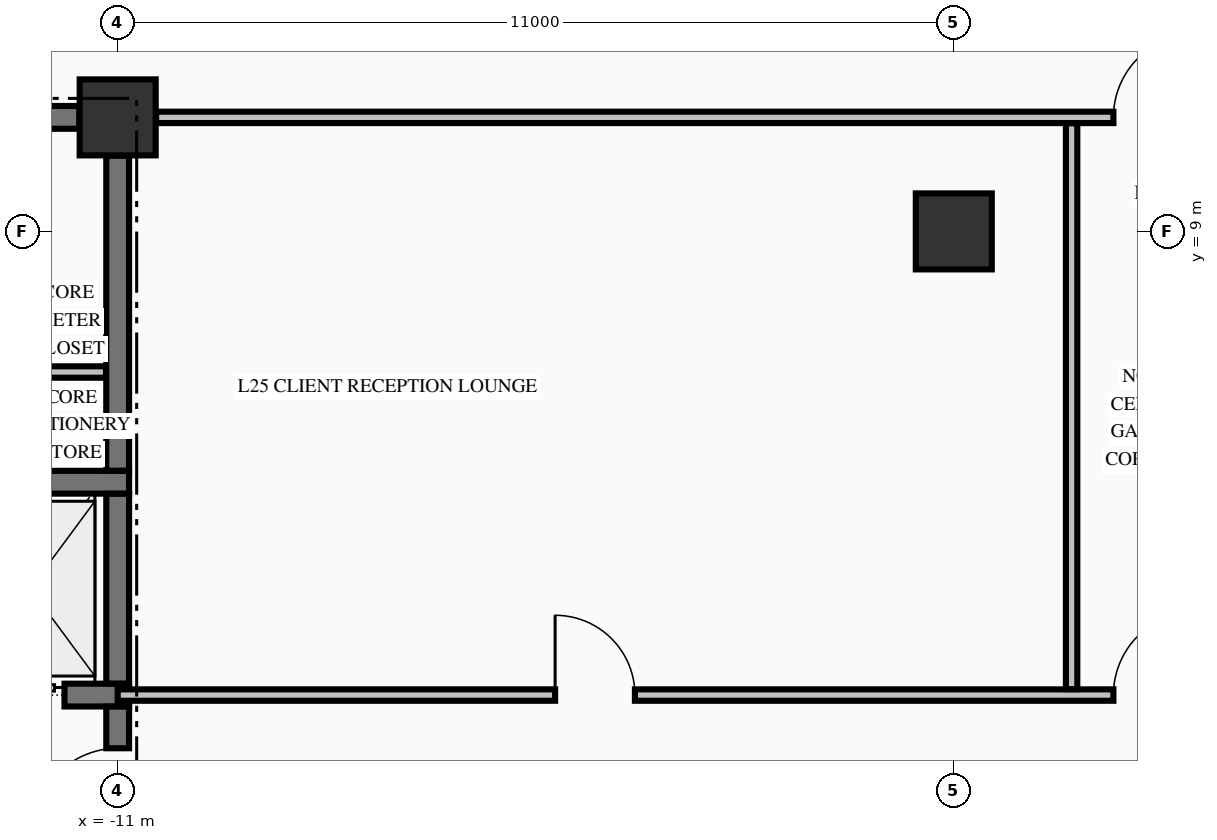
"""IFC4 building model, lengths in metres.
Left out: names, types, materials, properties, quantities, classifications, styles, units other than length and angle.
Written with IfcOpenShell. Run it as: python <this file> out.ifc"""

import sys

from ifc_helpers import new_model, si_unit, direction, frame, frame_2d, origin, origin_2d, place, context, subcontext, project, spatial, rectangle, extrude, element, fill, save


model = new_model("IFC4")
c1 = context("Model", 3, precision=1e-05, world=origin(), true_north=direction((0.0, 1.0)))
c2 = subcontext(c1, "Body", "Model", "MODEL_VIEW")
j1 = project(units=[si_unit("LENGTHUNIT", "METRE"), si_unit("PLANEANGLEUNIT", "RADIAN")], contexts=[c1])
p1 = place(None, origin())
s1 = spatial("IfcSite", under=j1, at=p1, CompositionType="ELEMENT")
p2 = place(p1, origin())
s2 = spatial("IfcBuilding", under=s1, at=p2, CompositionType="ELEMENT")
p3 = place(p2, frame((0.0, 0.0, 102.07)))
s3 = spatial("IfcBuildingStorey", under=s2, at=p3, CompositionType="ELEMENT", Elevation=102.07)
for number, where, z_axis, x_axis in (
    (1, (-11.0, 10.5, -0.25), (0.0, 0.0, 1.0), (1.0, 0.0, 0.0)),
    (2, (0.0, 9.0, -0.25), (0.0, 0.0, 1.0), (1.0, 0.0, 0.0)),
):
    element("IfcColumn", number, at=place(p3, frame(where, z_axis=z_axis, x_axis=x_axis)), inside=s3, PredefinedType="COLUMN", context=c2, shape_type="SweptSolid", body=[
        extrude(rectangle(XDim=1.0, YDim=1.0, at=origin_2d()), origin(), (0.0, 0.0, 1.0), 3.57),
    ])
p4 = place(p3, frame((-14.875, 2.9, 0.0), z_axis=(0.0, 0.0, 1.0), x_axis=(1.0, 0.0, 0.0)))
e3 = element("IfcWall", 3, at=p4, inside=s3, PredefinedType="SHEAR", context=c2, shape_type="SweptSolid", body=[
    extrude(rectangle(XDim=4.025, YDim=0.3, at=frame_2d((2.012, 0.0))), origin(), (0.0, 0.0, 1.0), 3.32),
])
p5 = place(p4, frame((2.075, 0.0, 0.0)))
e4 = element("IfcOpeningElement", 4, at=p5, cuts=e3, PredefinedType="OPENING", context=c2, shape_type="SweptSolid", body=[
    extrude(rectangle(XDim=1.1, YDim=2.2, at=frame_2d((0.55, 1.1))), frame((0.0, 0.16, 0.0), z_axis=(0.0, -1.0, 0.0), x_axis=(1.0, 0.0, 0.0)), (0.0, 0.0, 1.0), 0.32),
])
p6 = place(p3, frame((-14.875, 5.7, 0.0), z_axis=(0.0, 0.0, 1.0), x_axis=(1.0, 0.0, 0.0)))
e5 = element("IfcWall", 5, at=p6, inside=s3, PredefinedType="SHEAR", context=c2, shape_type="SweptSolid", body=[
    extrude(rectangle(XDim=4.025, YDim=0.3, at=frame_2d((2.012, 0.0))), origin(), (0.0, 0.0, 1.0), 3.32),
])
p7 = place(p3, frame((-14.7, 10.5, 0.0), z_axis=(0.0, 0.0, 1.0), x_axis=(1.0, 0.0, 0.0)))
e6 = element("IfcWall", 6, at=p7, inside=s3, PredefinedType="SHEAR", context=c2, shape_type="SweptSolid", body=[
    extrude(rectangle(XDim=3.196, YDim=0.3, at=frame_2d((1.598, 0.0))), origin(), (0.0, 0.0, 1.0), 3.32),
])
p8 = place(p7, frame((0.305, 0.0, 0.0)))
e7 = element("IfcOpeningElement", 7, at=p8, cuts=e6, PredefinedType="OPENING", context=c2, shape_type="SweptSolid", body=[
    extrude(rectangle(XDim=0.95, YDim=2.15, at=frame_2d((0.475, 1.075))), frame((0.0, 0.16, 0.0), z_axis=(0.0, -1.0, 0.0), x_axis=(1.0, 0.0, 0.0)), (0.0, 0.0, 1.0), 0.32),
])
p9 = place(p3, frame((-11.0, 2.9, 0.0), z_axis=(0.0, 0.0, 1.0), x_axis=(1.0, 0.0, 0.0)))
e8 = element("IfcWall", 8, at=p9, inside=s3, PredefinedType="PARTITIONING", context=c2, shape_type="SweptSolid", body=[
    extrude(rectangle(XDim=22.0, YDim=0.15, at=frame_2d((11.0, 0.0))), origin(), (0.0, 0.0, 1.0), 3.32),
])
p10 = place(p9, frame((13.1, 0.0, 0.0)))
e9 = element("IfcOpeningElement", 9, at=p10, cuts=e8, PredefinedType="OPENING", context=c2, shape_type="SweptSolid", body=[
    extrude(rectangle(XDim=1.1, YDim=2.15, at=frame_2d((0.55, 1.075))), frame((0.0, 0.085, 0.0), z_axis=(0.0, -1.0, 0.0), x_axis=(1.0, 0.0, 0.0)), (0.0, 0.0, 1.0), 0.17),
])
p11 = place(p9, frame((5.755, 0.0, 0.0)))
e10 = element("IfcOpeningElement", 10, at=p11, cuts=e8, PredefinedType="OPENING", context=c2, shape_type="SweptSolid", body=[
    extrude(rectangle(XDim=1.05, YDim=2.15, at=frame_2d((0.525, 1.075))), frame((0.0, 0.085, 0.0), z_axis=(0.0, -1.0, 0.0), x_axis=(1.0, 0.0, 0.0)), (0.0, 0.0, 1.0), 0.17),
])
p12 = place(p9, frame((15.755, 0.0, 0.0)))
e11 = element("IfcOpeningElement", 11, at=p12, cuts=e8, PredefinedType="OPENING", context=c2, shape_type="SweptSolid", body=[
    extrude(rectangle(XDim=0.95, YDim=2.15, at=frame_2d((0.475, 1.075))), frame((0.0, 0.085, 0.0), z_axis=(0.0, -1.0, 0.0), x_axis=(1.0, 0.0, 0.0)), (0.0, 0.0, 1.0), 0.17),
])
p13 = place(p9, frame((19.385, 0.0, 0.0)))
e12 = element("IfcOpeningElement", 12, at=p13, cuts=e8, PredefinedType="OPENING", context=c2, shape_type="SweptSolid", body=[
    extrude(rectangle(XDim=0.95, YDim=2.15, at=frame_2d((0.475, 1.075))), frame((0.0, 0.085, 0.0), z_axis=(0.0, -1.0, 0.0), x_axis=(1.0, 0.0, 0.0)), (0.0, 0.0, 1.0), 0.17),
])
p14 = place(p3, frame((-13.225, 7.15, 0.0), z_axis=(0.0, 0.0, 1.0), x_axis=(1.0, 0.0, 0.0)))
e13 = element("IfcWall", 13, at=p14, inside=s3, PredefinedType="PARTITIONING", context=c2, shape_type="SweptSolid", body=[
    extrude(rectangle(XDim=2.072, YDim=0.15, at=frame_2d((1.036, 0.0))), origin(), (0.0, 0.0, 1.0), 3.32),
])
p15 = place(p3, frame((-10.494, 10.5, 0.0), z_axis=(0.0, 0.0, 1.0), x_axis=(1.0, 0.0, 0.0)))
e14 = element("IfcWall", 14, at=p15, inside=s3, PredefinedType="PARTITIONING", context=c2, shape_type="SweptSolid", body=[
    extrude(rectangle(XDim=20.988, YDim=0.15, at=frame_2d((10.494, 0.0))), origin(), (0.0, 0.0, 1.0), 3.32),
])
p16 = place(p15, frame((12.594, 0.0, 0.0)))
e15 = element("IfcOpeningElement", 15, at=p16, cuts=e14, PredefinedType="OPENING", context=c2, shape_type="SweptSolid", body=[
    extrude(rectangle(XDim=1.1, YDim=2.15, at=frame_2d((0.55, 1.075))), frame((0.0, 0.085, 0.0), z_axis=(0.0, -1.0, 0.0), x_axis=(1.0, 0.0, 0.0)), (0.0, 0.0, 1.0), 0.17),
])
p17 = place(p3, frame((-11.0, 0.504, 0.0), z_axis=(0.0, 0.0, 1.0), x_axis=(0.0, 1.0, 0.0)))
e16 = element("IfcWall", 16, at=p17, inside=s3, PredefinedType="SHEAR", context=c2, shape_type="SweptSolid", body=[
    extrude(rectangle(XDim=2.244, YDim=0.3, at=frame_2d((1.122, 0.0))), origin(), (0.0, 0.0, 1.0), 3.32),
])
p18 = place(p17, frame((0.596, 0.0, 0.0)))
e17 = element("IfcOpeningElement", 17, at=p18, cuts=e16, PredefinedType="OPENING", context=c2, shape_type="SweptSolid", body=[
    extrude(rectangle(XDim=1.1, YDim=2.15, at=frame_2d((0.55, 1.075))), frame((0.0, 0.16, 0.0), z_axis=(0.0, -1.0, 0.0), x_axis=(1.0, 0.0, 0.0)), (0.0, 0.0, 1.0), 0.32),
])
p19 = place(p3, frame((-11.0, 3.052, 0.0), z_axis=(0.0, 0.0, 1.0), x_axis=(0.0, 1.0, 0.0)))
e18 = element("IfcWall", 18, at=p19, inside=s3, PredefinedType="SHEAR", context=c2, shape_type="SweptSolid", body=[
    extrude(rectangle(XDim=2.496, YDim=0.3, at=frame_2d((1.248, 0.0))), origin(), (0.0, 0.0, 1.0), 3.32),
])
p20 = place(p3, frame((-11.0, 5.852, 0.0), z_axis=(0.0, 0.0, 1.0), x_axis=(0.0, 1.0, 0.0)))
e19 = element("IfcWall", 19, at=p20, inside=s3, PredefinedType="SHEAR", context=c2, shape_type="SweptSolid", body=[
    extrude(rectangle(XDim=4.144, YDim=0.3, at=frame_2d((2.072, 0.0))), origin(), (0.0, 0.0, 1.0), 3.32),
])
p21 = place(p3, frame((1.55, 2.978, 0.0), z_axis=(0.0, 0.0, 1.0), x_axis=(0.0, 1.0, 0.0)))
e20 = element("IfcWall", 20, at=p21, inside=s3, PredefinedType="PARTITIONING", context=c2, shape_type="SweptSolid", body=[
    extrude(rectangle(XDim=7.444, YDim=0.15, at=frame_2d((3.722, 0.0))), origin(), (0.0, 0.0, 1.0), 3.32),
])
p22 = place(p18, origin())
e21 = element("IfcDoor", 21, at=p22, inside=s3, OperationType="SINGLE_SWING_LEFT", PredefinedType="DOOR", context=c2, shape_type="SweptSolid", body=[
    extrude(rectangle(XDim=1.1, YDim=2.15, at=frame_2d((0.55, 1.075))), frame((0.0, 0.025, 0.0), z_axis=(0.0, -1.0, 0.0), x_axis=(1.0, 0.0, 0.0)), (0.0, 0.0, 1.0), 0.05),
])
fill(e17, e21)
p23 = place(p5, origin())
e22 = element("IfcDoor", 22, at=p23, inside=s3, OperationType="SLIDING_TO_LEFT", PredefinedType="DOOR", context=c2, shape_type="SweptSolid", body=[
    extrude(rectangle(XDim=1.1, YDim=2.2, at=frame_2d((0.55, 1.1))), frame((0.0, 0.025, 0.0), z_axis=(0.0, -1.0, 0.0), x_axis=(1.0, 0.0, 0.0)), (0.0, 0.0, 1.0), 0.05),
])
fill(e4, e22)
p24 = place(p16, origin())
e23 = element("IfcDoor", 23, at=p24, inside=s3, OperationType="SINGLE_SWING_RIGHT", PredefinedType="DOOR", context=c2, shape_type="SweptSolid", body=[
    extrude(rectangle(XDim=1.1, YDim=2.15, at=frame_2d((0.55, 1.075))), frame((0.0, 0.025, 0.0), z_axis=(0.0, -1.0, 0.0), x_axis=(1.0, 0.0, 0.0)), (0.0, 0.0, 1.0), 0.05),
])
fill(e15, e23)
p25 = place(p10, origin())
e24 = element("IfcDoor", 24, at=p25, inside=s3, OperationType="SINGLE_SWING_RIGHT", PredefinedType="DOOR", context=c2, shape_type="SweptSolid", body=[
    extrude(rectangle(XDim=1.1, YDim=2.15, at=frame_2d((0.55, 1.075))), frame((0.0, 0.025, 0.0), z_axis=(0.0, -1.0, 0.0), x_axis=(1.0, 0.0, 0.0)), (0.0, 0.0, 1.0), 0.05),
])
fill(e9, e24)
p26 = place(p11, origin())
e25 = element("IfcDoor", 25, at=p26, inside=s3, OperationType="SINGLE_SWING_LEFT", PredefinedType="DOOR", context=c2, shape_type="SweptSolid", body=[
    extrude(rectangle(XDim=1.05, YDim=2.15, at=frame_2d((0.525, 1.075))), frame((0.0, 0.025, 0.0), z_axis=(0.0, -1.0, 0.0), x_axis=(1.0, 0.0, 0.0)), (0.0, 0.0, 1.0), 0.05),
])
fill(e10, e25)
save(model, sys.argv[1])
